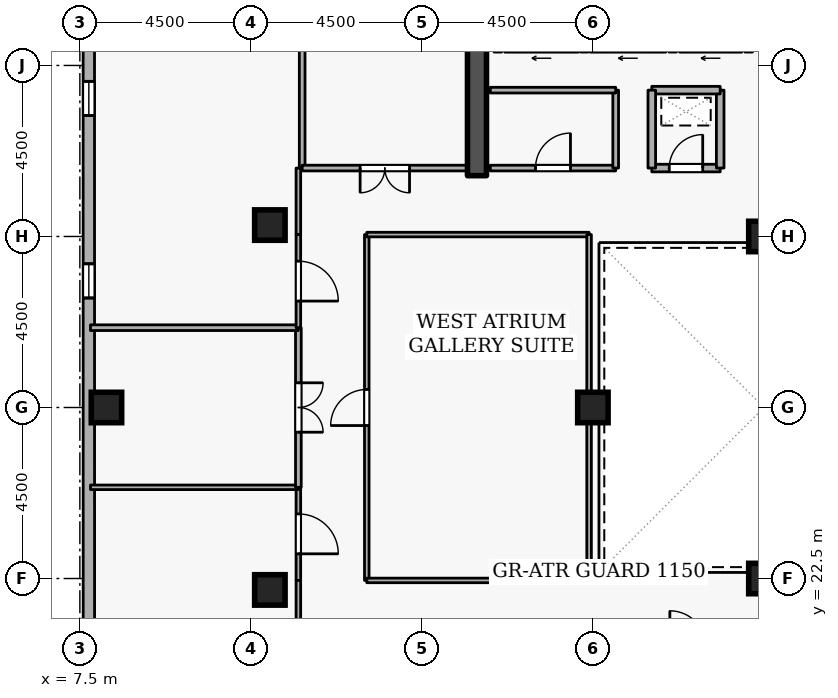
"""IFC4 building model, lengths in metres.
Left out: names, types, materials, properties, quantities, classifications, styles, units other than length and angle.
Written with IfcOpenShell. Run it as: python <this file> out.ifc"""

import sys

from ifc_helpers import new_model, si_unit, direction, frame, frame_2d, origin, origin_2d, place, context, subcontext, project, spatial, rectangle, extrude, element, fill, save


model = new_model("IFC4")
c1 = context("Model", 3, precision=1e-05, world=origin(), true_north=direction((0.0, 1.0)))
c2 = subcontext(c1, "Body", "Model", "MODEL_VIEW")
j1 = project(units=[si_unit("LENGTHUNIT", "METRE"), si_unit("PLANEANGLEUNIT", "RADIAN")], contexts=[c1])
p1 = place(None, origin())
s1 = spatial("IfcSite", under=j1, at=p1, CompositionType="ELEMENT")
p2 = place(p1, origin())
s2 = spatial("IfcBuilding", under=s1, at=p2, CompositionType="ELEMENT")
p3 = place(p2, frame((0.0, 0.0, 261.9)))
s3 = spatial("IfcBuildingStorey", under=s2, at=p3, CompositionType="ELEMENT", Elevation=261.9)
p4 = place(p3, frame((17.95, 33.1, 0.0), z_axis=(0.0, 0.0, 1.0), x_axis=(0.0, 1.0, 0.0)))
e1 = element("IfcWall", 1, at=p4, inside=s3, PredefinedType="SHEAR", context=c2, shape_type="SweptSolid", body=[
    extrude(rectangle(XDim=5.8, YDim=0.5, at=frame_2d((2.9, 0.0))), origin(), (0.0, 0.0, 1.0), 3.6),
])
for number, where, z_axis, x_axis in (
    (2, (8.2, 27.0, 0.0), (0.0, 0.0, 1.0), (1.0, 0.0, 0.0)),
    (3, (12.5, 22.2, 0.0), (0.0, 0.0, 1.0), (1.0, 0.0, 0.0)),
    (4, (12.5, 31.8, 0.0), (0.0, 0.0, 1.0), (1.0, 0.0, 0.0)),
    (5, (25.5, 22.5, 0.0), (0.0, 0.0, 1.0), (1.0, 0.0, 0.0)),
    (6, (25.5, 31.5, 0.0), (0.0, 0.0, 1.0), (1.0, 0.0, 0.0)),
    (7, (21.0, 27.0, 0.0), (0.0, 0.0, 1.0), (1.0, 0.0, 0.0)),
):
    element("IfcColumn", number, at=place(p3, frame(where, z_axis=z_axis, x_axis=x_axis)), inside=s3, PredefinedType="COLUMN", context=c2, shape_type="SweptSolid", body=[
        extrude(rectangle(XDim=0.8, YDim=0.8, at=origin_2d()), origin(), (0.0, 0.0, 1.0), 3.6),
    ])
p5 = place(p3, frame((7.735, 42.181, 0.0), z_axis=(0.0, 0.0, 1.0), x_axis=(0.000103863011, -0.999999994606, 0.0)))
e8 = element("IfcWall", 8, at=p5, inside=s3, PredefinedType="STANDARD", context=c2, shape_type="SweptSolid", body=[
    extrude(rectangle(XDim=35.259, YDim=0.3, at=frame_2d((17.629, 0.0))), origin(), (0.0, 0.0, 1.0), 2.7),
])
p6 = place(p5, frame((6.6, 0.0, 0.72)))
e9 = element("IfcOpeningElement", 9, at=p6, cuts=e8, PredefinedType="OPENING", context=c2, shape_type="SweptSolid", body=[
    extrude(rectangle(XDim=0.9, YDim=1.75, at=frame_2d((0.45, 0.875))), frame((0.0, 0.16, 0.0), z_axis=(0.0, -1.0, 0.0), x_axis=(1.0, 0.0, 0.0)), (0.0, 0.0, 1.0), 0.32),
])
p7 = place(p5, frame((11.4, 0.0, 0.72)))
e10 = element("IfcOpeningElement", 10, at=p7, cuts=e8, PredefinedType="OPENING", context=c2, shape_type="SweptSolid", body=[
    extrude(rectangle(XDim=0.9, YDim=1.75, at=frame_2d((0.45, 0.875))), frame((0.0, 0.16, 0.0), z_axis=(0.0, -1.0, 0.0), x_axis=(1.0, 0.0, 0.0)), (0.0, 0.0, 1.0), 0.32),
])
p8 = place(p5, frame((21.0, 0.0, 0.72)))
e11 = element("IfcOpeningElement", 11, at=p8, cuts=e8, PredefinedType="OPENING", context=c2, shape_type="SweptSolid", body=[
    extrude(rectangle(XDim=0.9, YDim=1.75, at=frame_2d((0.45, 0.875))), frame((0.0, 0.16, 0.0), z_axis=(0.0, -1.0, 0.0), x_axis=(1.0, 0.0, 0.0)), (0.0, 0.0, 1.0), 0.32),
])
p9 = place(p5, frame((25.8, 0.0, 0.72)))
e12 = element("IfcOpeningElement", 12, at=p9, cuts=e8, PredefinedType="OPENING", context=c2, shape_type="SweptSolid", body=[
    extrude(rectangle(XDim=0.9, YDim=1.75, at=frame_2d((0.45, 0.875))), frame((0.0, 0.16, 0.0), z_axis=(0.0, -1.0, 0.0), x_axis=(1.0, 0.0, 0.0)), (0.0, 0.0, 1.0), 0.32),
])
p10 = place(p5, frame((30.6, 0.0, 0.72)))
e13 = element("IfcOpeningElement", 13, at=p10, cuts=e8, PredefinedType="OPENING", context=c2, shape_type="SweptSolid", body=[
    extrude(rectangle(XDim=0.9, YDim=1.75, at=frame_2d((0.45, 0.875))), frame((0.0, 0.16, 0.0), z_axis=(0.0, -1.0, 0.0), x_axis=(1.0, 0.0, 0.0)), (0.0, 0.0, 1.0), 0.32),
])
p11 = place(p3, frame((24.92, 36.45, 0.0), z_axis=(0.0, 0.0, 1.0), x_axis=(-1.0, 0.0, 0.0)))
e14 = element("IfcWall", 14, at=p11, inside=s3, PredefinedType="STANDARD", context=c2, shape_type="SweptSolid", body=[
    extrude(rectangle(XDim=1.64, YDim=0.2, at=frame_2d((0.82, 0.0))), origin(), (0.0, 0.0, 1.0), 3.34),
])
p12 = place(p11, frame((0.31, 0.0, 0.0)))
e15 = element("IfcOpeningElement", 15, at=p12, cuts=e14, PredefinedType="OPENING", context=c2, shape_type="SweptSolid", body=[
    extrude(rectangle(XDim=1.02, YDim=2.06, at=frame_2d((0.51, 1.03))), frame((0.0, 0.11, 0.0), z_axis=(0.0, -1.0, 0.0), x_axis=(1.0, 0.0, 0.0)), (0.0, 0.0, 1.0), 0.22),
])
p13 = place(p3, frame((22.92, 36.45, 0.0), z_axis=(0.0, 0.0, 1.0), x_axis=(-1.0, 0.0, 0.0)))
e16 = element("IfcWall", 16, at=p13, inside=s3, PredefinedType="STANDARD", context=c2, shape_type="SweptSolid", body=[
    extrude(rectangle(XDim=1.99, YDim=0.2, at=frame_2d((0.995, 0.0))), origin(), (0.0, 0.0, 1.0), 3.34),
])
p14 = place(p13, frame((0.485, 0.0, 0.0)))
e17 = element("IfcOpeningElement", 17, at=p14, cuts=e16, PredefinedType="OPENING", context=c2, shape_type="SweptSolid", body=[
    extrude(rectangle(XDim=1.02, YDim=2.06, at=frame_2d((0.51, 1.03))), frame((0.0, 0.11, 0.0), z_axis=(0.0, -1.0, 0.0), x_axis=(1.0, 0.0, 0.0)), (0.0, 0.0, 1.0), 0.22),
])
p15 = place(p3, frame((20.62, 36.45, 0.0), z_axis=(0.0, 0.0, 1.0), x_axis=(-1.0, 0.0, 0.0)))
e18 = element("IfcWall", 18, at=p15, inside=s3, PredefinedType="STANDARD", context=c2, shape_type="SweptSolid", body=[
    extrude(rectangle(XDim=1.94, YDim=0.2, at=frame_2d((0.97, 0.0))), origin(), (0.0, 0.0, 1.0), 3.34),
])
p16 = place(p15, frame((0.46, 0.0, 0.0)))
e19 = element("IfcOpeningElement", 19, at=p16, cuts=e18, PredefinedType="OPENING", context=c2, shape_type="SweptSolid", body=[
    extrude(rectangle(XDim=1.02, YDim=2.06, at=frame_2d((0.51, 1.03))), frame((0.0, 0.11, 0.0), z_axis=(0.0, -1.0, 0.0), x_axis=(1.0, 0.0, 0.0)), (0.0, 0.0, 1.0), 0.22),
])
p17 = place(p3, frame((22.55, 33.3, 0.0), z_axis=(0.0, 0.0, 1.0), x_axis=(1.0, 0.0, 0.0)))
e20 = element("IfcWall", 20, at=p17, inside=s3, PredefinedType="STANDARD", context=c2, shape_type="SweptSolid", body=[
    extrude(rectangle(XDim=1.8, YDim=0.2, at=frame_2d((0.9, 0.0))), origin(), (0.0, 0.0, 1.0), 3.34),
])
p18 = place(p17, frame((0.46, 0.0, 0.0)))
e21 = element("IfcOpeningElement", 21, at=p18, cuts=e20, PredefinedType="OPENING", context=c2, shape_type="SweptSolid", body=[
    extrude(rectangle(XDim=0.88, YDim=2.04, at=frame_2d((0.44, 1.02))), frame((0.0, 0.11, 0.0), z_axis=(0.0, -1.0, 0.0), x_axis=(1.0, 0.0, 0.0)), (0.0, 0.0, 1.0), 0.22),
])
p19 = place(p3, frame((24.35, 33.3, 0.0), z_axis=(0.0, 0.0, 1.0), x_axis=(0.0, 1.0, 0.0)))
e22 = element("IfcWall", 22, at=p19, inside=s3, PredefinedType="STANDARD", context=c2, shape_type="SweptSolid", body=[
    extrude(rectangle(XDim=2.05, YDim=0.2, at=frame_2d((1.025, 0.0))), origin(), (0.0, 0.0, 1.0), 3.34),
])
p20 = place(p3, frame((24.35, 35.35, 0.0), z_axis=(0.0, 0.0, 1.0), x_axis=(-1.0, 0.0, 0.0)))
e23 = element("IfcWall", 23, at=p20, inside=s3, PredefinedType="STANDARD", context=c2, shape_type="SweptSolid", body=[
    extrude(rectangle(XDim=1.8, YDim=0.2, at=frame_2d((0.9, 0.0))), origin(), (0.0, 0.0, 1.0), 3.34),
])
p21 = place(p3, frame((22.55, 35.35, 0.0), z_axis=(0.0, 0.0, 1.0), x_axis=(0.0, -1.0, 0.0)))
e24 = element("IfcWall", 24, at=p21, inside=s3, PredefinedType="STANDARD", context=c2, shape_type="SweptSolid", body=[
    extrude(rectangle(XDim=2.05, YDim=0.2, at=frame_2d((1.025, 0.0))), origin(), (0.0, 0.0, 1.0), 3.34),
])
p22 = place(p3, frame((18.3, 33.3, 0.0), z_axis=(0.0, 0.0, 1.0), x_axis=(1.0, 0.0, 0.0)))
e25 = element("IfcWall", 25, at=p22, inside=s3, PredefinedType="PARTITIONING", context=c2, shape_type="SweptSolid", body=[
    extrude(rectangle(XDim=3.3, YDim=0.15, at=frame_2d((1.65, 0.0))), origin(), (0.0, 0.0, 1.0), 3.34),
])
p23 = place(p22, frame((1.19, 0.0, 0.0)))
e26 = element("IfcOpeningElement", 26, at=p23, cuts=e25, PredefinedType="OPENING", context=c2, shape_type="SweptSolid", body=[
    extrude(rectangle(XDim=0.92, YDim=2.08, at=frame_2d((0.46, 1.04))), frame((0.0, 0.085, 0.0), z_axis=(0.0, -1.0, 0.0), x_axis=(1.0, 0.0, 0.0)), (0.0, 0.0, 1.0), 0.17),
])
p24 = place(p3, frame((21.6, 33.3, 0.0), z_axis=(0.0, 0.0, 1.0), x_axis=(0.0, 1.0, 0.0)))
e27 = element("IfcWall", 27, at=p24, inside=s3, PredefinedType="PARTITIONING", context=c2, shape_type="SweptSolid", body=[
    extrude(rectangle(XDim=2.05, YDim=0.15, at=frame_2d((1.025, 0.0))), origin(), (0.0, 0.0, 1.0), 3.34),
])
p25 = place(p3, frame((21.6, 35.35, 0.0), z_axis=(0.0, 0.0, 1.0), x_axis=(-1.0, 0.0, 0.0)))
e28 = element("IfcWall", 28, at=p25, inside=s3, PredefinedType="PARTITIONING", context=c2, shape_type="SweptSolid", body=[
    extrude(rectangle(XDim=3.3, YDim=0.15, at=frame_2d((1.65, 0.0))), origin(), (0.0, 0.0, 1.0), 3.34),
])
p26 = place(p3, frame((13.35, 33.3, 0.0), z_axis=(0.0, 0.0, 1.0), x_axis=(0.0, 1.0, 0.0)))
e29 = element("IfcWall", 29, at=p26, inside=s3, PredefinedType="PARTITIONING", context=c2, shape_type="SweptSolid", body=[
    extrude(rectangle(XDim=11.42, YDim=0.15, at=frame_2d((5.71, 0.0))), origin(), (0.0, 0.0, 1.0), 3.34),
])
p27 = place(p3, frame((17.7, 33.3, 0.0), z_axis=(0.0, 0.0, 1.0), x_axis=(-1.0, 0.0, 0.0)))
e30 = element("IfcWall", 30, at=p27, inside=s3, PredefinedType="PARTITIONING", context=c2, shape_type="SweptSolid", body=[
    extrude(rectangle(XDim=4.35, YDim=0.15, at=frame_2d((2.175, 0.0))), origin(), (0.0, 0.0, 1.0), 3.34),
])
p28 = place(p27, frame((1.525, 0.0, 0.0)))
e31 = element("IfcOpeningElement", 31, at=p28, cuts=e30, PredefinedType="OPENING", context=c2, shape_type="SweptSolid", body=[
    extrude(rectangle(XDim=1.3, YDim=2.12, at=frame_2d((0.65, 1.06))), frame((0.0, 0.085, 0.0), z_axis=(0.0, -1.0, 0.0), x_axis=(1.0, 0.0, 0.0)), (0.0, 0.0, 1.0), 0.17),
])
p29 = place(p3, frame((13.25, 24.9, 0.0), z_axis=(0.0, 0.0, 1.0), x_axis=(0.0, -1.0, 0.0)))
e32 = element("IfcWall", 32, at=p29, inside=s3, PredefinedType="PARTITIONING", context=c2, shape_type="SweptSolid", body=[
    extrude(rectangle(XDim=2.45, YDim=0.12, at=frame_2d((1.225, 0.0))), origin(), (0.0, 0.0, 1.0), 3.34),
])
p30 = place(p29, frame((0.7, 0.0, 0.0)))
e33 = element("IfcOpeningElement", 33, at=p30, cuts=e32, PredefinedType="OPENING", context=c2, shape_type="SweptSolid", body=[
    extrude(rectangle(XDim=1.05, YDim=2.1, at=frame_2d((0.525, 1.05))), frame((0.0, 0.07, 0.0), z_axis=(0.0, -1.0, 0.0), x_axis=(1.0, 0.0, 0.0)), (0.0, 0.0, 1.0), 0.14),
])
p31 = place(p3, frame((13.25, 22.45, 0.0), z_axis=(0.0, 0.0, 1.0), x_axis=(0.0, -1.0, 0.0)))
e34 = element("IfcWall", 34, at=p31, inside=s3, PredefinedType="PARTITIONING", context=c2, shape_type="SweptSolid", body=[
    extrude(rectangle(XDim=1.75, YDim=0.12, at=frame_2d((0.875, 0.0))), origin(), (0.0, 0.0, 1.0), 3.34),
])
p32 = place(p3, frame((7.78, 24.9, 0.0), z_axis=(0.0, 0.0, 1.0), x_axis=(1.0, 0.0, 0.0)))
e35 = element("IfcWall", 35, at=p32, inside=s3, PredefinedType="PARTITIONING", context=c2, shape_type="SweptSolid", body=[
    extrude(rectangle(XDim=5.47, YDim=0.12, at=frame_2d((2.735, 0.0))), origin(), (0.0, 0.0, 1.0), 3.34),
])
p33 = place(p3, frame((13.25, 29.1, 0.0), z_axis=(0.0, 0.0, 1.0), x_axis=(0.0, -1.0, 0.0)))
e36 = element("IfcWall", 36, at=p33, inside=s3, PredefinedType="PARTITIONING", context=c2, shape_type="SweptSolid", body=[
    extrude(rectangle(XDim=4.2, YDim=0.15, at=frame_2d((2.1, 0.0))), origin(), (0.0, 0.0, 1.0), 3.34),
])
p34 = place(p33, frame((1.45, 0.0, 0.0)))
e37 = element("IfcOpeningElement", 37, at=p34, cuts=e36, PredefinedType="OPENING", context=c2, shape_type="SweptSolid", body=[
    extrude(rectangle(XDim=1.3, YDim=2.12, at=frame_2d((0.65, 1.06))), frame((0.0, 0.085, 0.0), z_axis=(0.0, -1.0, 0.0), x_axis=(1.0, 0.0, 0.0)), (0.0, 0.0, 1.0), 0.17),
])
p35 = place(p3, frame((7.78, 29.1, 0.0), z_axis=(0.0, 0.0, 1.0), x_axis=(1.0, 0.0, 0.0)))
e38 = element("IfcWall", 38, at=p35, inside=s3, PredefinedType="PARTITIONING", context=c2, shape_type="SweptSolid", body=[
    extrude(rectangle(XDim=5.47, YDim=0.15, at=frame_2d((2.735, 0.0))), origin(), (0.0, 0.0, 1.0), 3.34),
])
p36 = place(p3, frame((13.25, 33.3, 0.0), z_axis=(0.0, 0.0, 1.0), x_axis=(0.0, -1.0, 0.0)))
e39 = element("IfcWall", 39, at=p36, inside=s3, PredefinedType="PARTITIONING", context=c2, shape_type="SweptSolid", body=[
    extrude(rectangle(XDim=1.75, YDim=0.12, at=frame_2d((0.875, 0.0))), origin(), (0.0, 0.0, 1.0), 3.34),
])
p37 = place(p3, frame((13.25, 31.55, 0.0), z_axis=(0.0, 0.0, 1.0), x_axis=(0.0, -1.0, 0.0)))
e40 = element("IfcWall", 40, at=p37, inside=s3, PredefinedType="PARTITIONING", context=c2, shape_type="SweptSolid", body=[
    extrude(rectangle(XDim=2.45, YDim=0.12, at=frame_2d((1.225, 0.0))), origin(), (0.0, 0.0, 1.0), 3.34),
])
p38 = place(p37, frame((0.7, 0.0, 0.0)))
e41 = element("IfcOpeningElement", 41, at=p38, cuts=e40, PredefinedType="OPENING", context=c2, shape_type="SweptSolid", body=[
    extrude(rectangle(XDim=1.05, YDim=2.1, at=frame_2d((0.525, 1.05))), frame((0.0, 0.07, 0.0), z_axis=(0.0, -1.0, 0.0), x_axis=(1.0, 0.0, 0.0)), (0.0, 0.0, 1.0), 0.14),
])
p39 = place(p3, frame((15.05, 22.45, 0.0), z_axis=(0.0, 0.0, 1.0), x_axis=(0.0, 1.0, 0.0)))
e42 = element("IfcWall", 42, at=p39, inside=s3, PredefinedType="PARTITIONING", context=c2, shape_type="SweptSolid", body=[
    extrude(rectangle(XDim=9.1, YDim=0.12, at=frame_2d((4.55, 0.0))), origin(), (0.0, 0.0, 1.0), 3.34),
])
p40 = place(p39, frame((4.075, 0.0, 0.0)))
e43 = element("IfcOpeningElement", 43, at=p40, cuts=e42, PredefinedType="OPENING", context=c2, shape_type="SweptSolid", body=[
    extrude(rectangle(XDim=0.95, YDim=2.1, at=frame_2d((0.475, 1.05))), frame((0.0, 0.07, 0.0), z_axis=(0.0, -1.0, 0.0), x_axis=(1.0, 0.0, 0.0)), (0.0, 0.0, 1.0), 0.14),
])
p41 = place(p3, frame((15.05, 31.55, 0.0), z_axis=(0.0, 0.0, 1.0), x_axis=(1.0, 0.0, 0.0)))
e44 = element("IfcWall", 44, at=p41, inside=s3, PredefinedType="PARTITIONING", context=c2, shape_type="SweptSolid", body=[
    extrude(rectangle(XDim=5.85, YDim=0.12, at=frame_2d((2.925, 0.0))), origin(), (0.0, 0.0, 1.0), 3.34),
])
p42 = place(p3, frame((20.9, 31.55, 0.0), z_axis=(0.0, 0.0, 1.0), x_axis=(0.0, -1.0, 0.0)))
e45 = element("IfcWall", 45, at=p42, inside=s3, PredefinedType="PARTITIONING", context=c2, shape_type="SweptSolid", body=[
    extrude(rectangle(XDim=9.1, YDim=0.12, at=frame_2d((4.55, 0.0))), origin(), (0.0, 0.0, 1.0), 3.34),
])
p43 = place(p3, frame((20.9, 22.45, 0.0), z_axis=(0.0, 0.0, 1.0), x_axis=(-1.0, 0.0, 0.0)))
e46 = element("IfcWall", 46, at=p43, inside=s3, PredefinedType="PARTITIONING", context=c2, shape_type="SweptSolid", body=[
    extrude(rectangle(XDim=5.85, YDim=0.12, at=frame_2d((2.925, 0.0))), origin(), (0.0, 0.0, 1.0), 3.34),
])
p44 = place(p6, origin())
e47 = element("IfcWindow", 47, at=p44, inside=s3, PartitioningType="SINGLE_PANEL", PredefinedType="WINDOW", context=c2, shape_type="SweptSolid", body=[
    extrude(rectangle(XDim=0.9, YDim=1.75, at=frame_2d((0.45, 0.875))), frame((0.0, 0.03, 0.0), z_axis=(0.0, -1.0, 0.0), x_axis=(1.0, 0.0, 0.0)), (0.0, 0.0, 1.0), 0.06),
])
fill(e9, e47)
p45 = place(p7, origin())
e48 = element("IfcWindow", 48, at=p45, inside=s3, PartitioningType="SINGLE_PANEL", PredefinedType="WINDOW", context=c2, shape_type="SweptSolid", body=[
    extrude(rectangle(XDim=0.9, YDim=1.75, at=frame_2d((0.45, 0.875))), frame((0.0, 0.03, 0.0), z_axis=(0.0, -1.0, 0.0), x_axis=(1.0, 0.0, 0.0)), (0.0, 0.0, 1.0), 0.06),
])
fill(e10, e48)
p46 = place(p18, origin())
e49 = element("IfcDoor", 49, at=p46, inside=s3, OperationType="SINGLE_SWING_RIGHT", PredefinedType="DOOR", context=c2, shape_type="SweptSolid", body=[
    extrude(rectangle(XDim=0.88, YDim=2.04, at=frame_2d((0.44, 1.02))), frame((0.0, 0.025, 0.0), z_axis=(0.0, -1.0, 0.0), x_axis=(1.0, 0.0, 0.0)), (0.0, 0.0, 1.0), 0.05),
])
fill(e21, e49)
p47 = place(p23, origin())
e50 = element("IfcDoor", 50, at=p47, inside=s3, OperationType="SINGLE_SWING_RIGHT", PredefinedType="DOOR", context=c2, shape_type="SweptSolid", body=[
    extrude(rectangle(XDim=0.92, YDim=2.08, at=frame_2d((0.46, 1.04))), frame((0.0, 0.025, 0.0), z_axis=(0.0, -1.0, 0.0), x_axis=(1.0, 0.0, 0.0)), (0.0, 0.0, 1.0), 0.05),
])
fill(e26, e50)
p48 = place(p28, origin())
e51 = element("IfcDoor", 51, at=p48, inside=s3, OperationType="DOUBLE_DOOR_SINGLE_SWING", PredefinedType="DOOR", context=c2, shape_type="SweptSolid", body=[
    extrude(rectangle(XDim=1.3, YDim=2.12, at=frame_2d((0.65, 1.06))), frame((0.0, 0.025, 0.0), z_axis=(0.0, -1.0, 0.0), x_axis=(1.0, 0.0, 0.0)), (0.0, 0.0, 1.0), 0.05),
])
fill(e31, e51)
p49 = place(p30, origin())
e52 = element("IfcDoor", 52, at=p49, inside=s3, OperationType="SINGLE_SWING_RIGHT", PredefinedType="DOOR", context=c2, shape_type="SweptSolid", body=[
    extrude(rectangle(XDim=1.05, YDim=2.1, at=frame_2d((0.525, 1.05))), frame((0.0, 0.025, 0.0), z_axis=(0.0, -1.0, 0.0), x_axis=(1.0, 0.0, 0.0)), (0.0, 0.0, 1.0), 0.05),
])
fill(e33, e52)
p50 = place(p34, origin())
e53 = element("IfcDoor", 53, at=p50, inside=s3, OperationType="DOUBLE_DOOR_SINGLE_SWING", PredefinedType="DOOR", context=c2, shape_type="SweptSolid", body=[
    extrude(rectangle(XDim=1.3, YDim=2.12, at=frame_2d((0.65, 1.06))), frame((0.0, 0.025, 0.0), z_axis=(0.0, -1.0, 0.0), x_axis=(1.0, 0.0, 0.0)), (0.0, 0.0, 1.0), 0.05),
])
fill(e37, e53)
p51 = place(p38, origin())
e54 = element("IfcDoor", 54, at=p51, inside=s3, OperationType="SINGLE_SWING_RIGHT", PredefinedType="DOOR", context=c2, shape_type="SweptSolid", body=[
    extrude(rectangle(XDim=1.05, YDim=2.1, at=frame_2d((0.525, 1.05))), frame((0.0, 0.025, 0.0), z_axis=(0.0, -1.0, 0.0), x_axis=(1.0, 0.0, 0.0)), (0.0, 0.0, 1.0), 0.05),
])
fill(e41, e54)
p52 = place(p40, origin())
e55 = element("IfcDoor", 55, at=p52, inside=s3, OperationType="SINGLE_SWING_LEFT", PredefinedType="DOOR", context=c2, shape_type="SweptSolid", body=[
    extrude(rectangle(XDim=0.95, YDim=2.1, at=frame_2d((0.475, 1.05))), frame((0.0, 0.025, 0.0), z_axis=(0.0, -1.0, 0.0), x_axis=(1.0, 0.0, 0.0)), (0.0, 0.0, 1.0), 0.05),
])
fill(e43, e55)
save(model, sys.argv[1])
